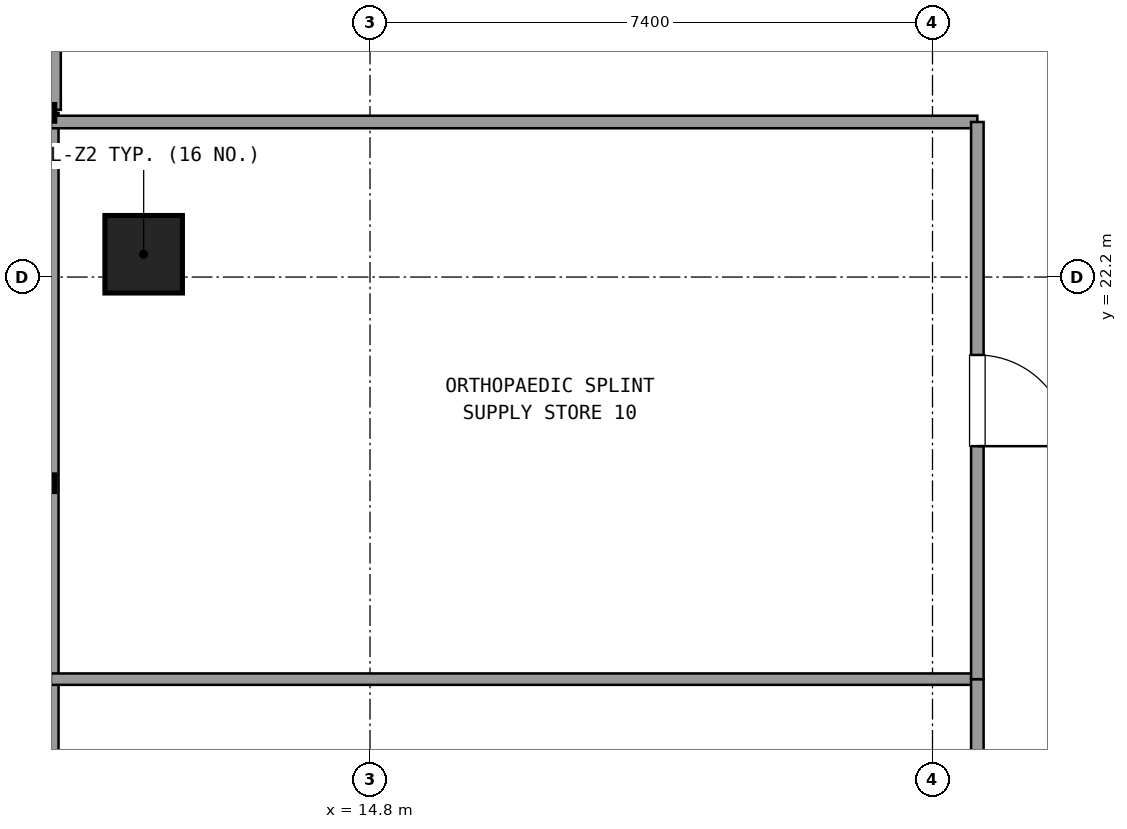
"""IFC4 building model, lengths in metres.
Left out: names, types, materials, properties, quantities, classifications, styles, units other than length and angle.
Written with IfcOpenShell. Run it as: python <this file> out.ifc"""

import sys

from ifc_helpers import new_model, si_unit, direction, frame, frame_2d, origin, origin_2d, place, context, subcontext, project, spatial, rectangle, extrude, element, fill, save


model = new_model("IFC4")
c1 = context("Model", 3, precision=1e-05, world=origin(), true_north=direction((0.0, 1.0)))
c2 = subcontext(c1, "Body", "Model", "MODEL_VIEW")
j1 = project(units=[si_unit("LENGTHUNIT", "METRE"), si_unit("PLANEANGLEUNIT", "RADIAN")], contexts=[c1])
p1 = place(None, origin())
s1 = spatial("IfcSite", under=j1, at=p1, CompositionType="ELEMENT")
p2 = place(p1, origin())
s2 = spatial("IfcBuilding", under=s1, at=p2, CompositionType="ELEMENT")
p3 = place(p2, frame((0.0, 0.0, 91.98)))
s3 = spatial("IfcBuildingStorey", under=s2, at=p3, CompositionType="ELEMENT", Elevation=91.98)
p4 = place(p3, frame((11.822, 22.5, 0.021), z_axis=(0.084573087246, 0.0, 0.99641727851), x_axis=(0.0, 1.0, 0.0)))
e1 = element("IfcColumn", 1, at=p4, inside=s3, PredefinedType="COLUMN", context=c2, shape_type="SweptSolid", body=[
    extrude(rectangle(XDim=1.02, YDim=1.02, at=origin_2d()), origin(), (0.0, 0.0, 1.0), 3.571),
])
p5 = place(p3, frame((10.582, 27.4, 0.0), z_axis=(0.0, 0.0, 1.0), x_axis=(0.0, -1.0, 0.0)))
e2 = element("IfcWall", 2, at=p5, inside=s3, PredefinedType="SOLIDWALL", context=c2, shape_type="SweptSolid", body=[
    extrude(rectangle(XDim=3.0, YDim=0.3, at=frame_2d((1.5, 0.0))), origin(), (0.0, 0.0, 1.0), 2.67),
])
p6 = place(p5, frame((0.9, 0.0, 0.0)))
e3 = element("IfcOpeningElement", 3, at=p6, cuts=e2, PredefinedType="OPENING", context=c2, shape_type="SweptSolid", body=[
    extrude(rectangle(XDim=1.2, YDim=2.2, at=frame_2d((0.6, 1.1))), frame((0.0, 0.16, 0.0), z_axis=(0.0, -1.0, 0.0), x_axis=(1.0, 0.0, 0.0)), (0.0, 0.0, 1.0), 0.32),
])
p7 = place(p3, frame((10.582, 24.36, 0.0), z_axis=(0.0, 0.0, 1.0), x_axis=(0.0, -1.0, 0.0)))
e4 = element("IfcWall", 4, at=p7, inside=s3, PredefinedType="SOLIDWALL", context=c2, shape_type="SweptSolid", body=[
    extrude(rectangle(XDim=14.616, YDim=0.24, at=frame_2d((7.308, 0.0))), origin(), (0.0, 0.0, 1.0), 0.85),
])
p8 = place(p3, frame((10.602, 24.24, 0.0), z_axis=(0.0, 0.0, 1.0), x_axis=(1.0, 0.0, 0.0)))
e5 = element("IfcWall", 5, at=p8, inside=s3, PredefinedType="PARTITIONING", context=c2, shape_type="SweptSolid", body=[
    extrude(rectangle(XDim=12.188, YDim=0.165, at=frame_2d((6.094, 0.0))), origin(), (0.0, 0.0, 1.0), 2.61),
])
p9 = place(p3, frame((22.79, 16.91, 0.0), z_axis=(0.0, 0.0, 1.0), x_axis=(-1.0, 0.0, 0.0)))
e6 = element("IfcWall", 6, at=p9, inside=s3, PredefinedType="PARTITIONING", context=c2, shape_type="SweptSolid", body=[
    extrude(rectangle(XDim=12.188, YDim=0.15, at=frame_2d((6.094, 0.0))), origin(), (0.0, 0.0, 1.0), 2.61),
])
p10 = place(p3, frame((22.79, 11.151, 0.0), z_axis=(0.0, 0.0, 1.0), x_axis=(0.0, 1.0, 0.0)))
e7 = element("IfcWall", 7, at=p10, inside=s3, PredefinedType="PARTITIONING", context=c2, shape_type="SweptSolid", body=[
    extrude(rectangle(XDim=5.759, YDim=0.165, at=frame_2d((2.879, 0.0))), origin(), (0.0, 0.0, 1.0), 2.61),
])
p11 = place(p10, frame((2.28, 0.0, 0.0)))
e8 = element("IfcOpeningElement", 8, at=p11, cuts=e7, PredefinedType="OPENING", context=c2, shape_type="SweptSolid", body=[
    extrude(rectangle(XDim=1.2, YDim=2.15, at=frame_2d((0.6, 1.075))), frame((0.0, 0.093, 0.0), z_axis=(0.0, -1.0, 0.0), x_axis=(1.0, 0.0, 0.0)), (0.0, 0.0, 1.0), 0.185),
])
p12 = place(p3, frame((22.79, 16.91, 0.0), z_axis=(0.0, 0.0, 1.0), x_axis=(0.0, 1.0, 0.0)))
e9 = element("IfcWall", 9, at=p12, inside=s3, PredefinedType="PARTITIONING", context=c2, shape_type="SweptSolid", body=[
    extrude(rectangle(XDim=7.33, YDim=0.165, at=frame_2d((3.665, 0.0))), origin(), (0.0, 0.0, 1.0), 2.61),
])
p13 = place(p12, frame((3.065, 0.0, 0.0)))
e10 = element("IfcOpeningElement", 10, at=p13, cuts=e9, PredefinedType="OPENING", context=c2, shape_type="SweptSolid", body=[
    extrude(rectangle(XDim=1.2, YDim=2.15, at=frame_2d((0.6, 1.075))), frame((0.0, 0.093, 0.0), z_axis=(0.0, -1.0, 0.0), x_axis=(1.0, 0.0, 0.0)), (0.0, 0.0, 1.0), 0.185),
])
p14 = place(p13, frame((1.2, 0.0, 0.0), z_axis=(0.0, 0.0, 1.0), x_axis=(-1.0, 0.0, 0.0)))
e11 = element("IfcDoor", 11, at=p14, inside=s3, OperationType="SINGLE_SWING_LEFT", PredefinedType="DOOR", context=c2, shape_type="SweptSolid", body=[
    extrude(rectangle(XDim=1.2, YDim=2.15, at=frame_2d((0.6, 1.075))), frame((0.0, 0.025, 0.0), z_axis=(0.0, -1.0, 0.0), x_axis=(1.0, 0.0, 0.0)), (0.0, 0.0, 1.0), 0.05),
])
fill(e10, e11)
save(model, sys.argv[1])
